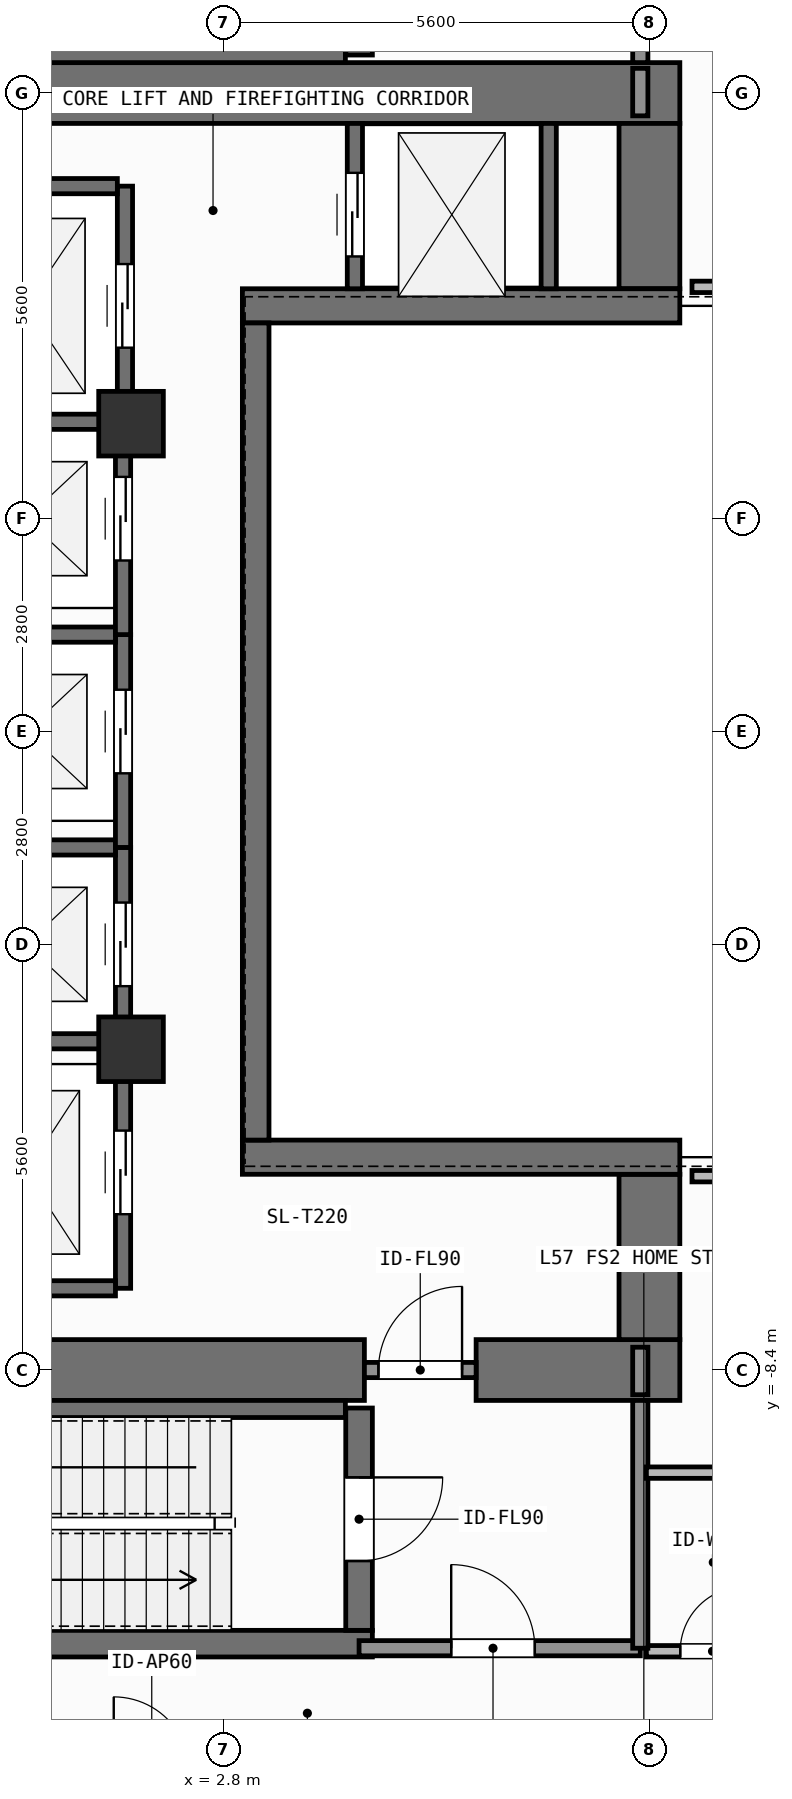
"""IFC4 building model, lengths in metres.
Left out: names, types, materials, properties, quantities, classifications, styles, units other than length and angle.
Written with IfcOpenShell. Run it as: python <this file> out.ifc"""

import sys

from ifc_helpers import new_model, si_unit, direction, frame, frame_2d, origin, origin_2d, place, context, subcontext, project, spatial, rectangle, extrude, element, fill, save


model = new_model("IFC4")
c1 = context("Model", 3, precision=1e-05, world=origin(), true_north=direction((0.0, 1.0)))
c2 = subcontext(c1, "Body", "Model", "MODEL_VIEW")
j1 = project(units=[si_unit("LENGTHUNIT", "METRE"), si_unit("PLANEANGLEUNIT", "RADIAN")], contexts=[c1])
p1 = place(None, origin())
s1 = spatial("IfcSite", under=j1, at=p1, CompositionType="ELEMENT")
p2 = place(p1, origin())
s2 = spatial("IfcBuilding", under=s1, at=p2, CompositionType="ELEMENT")
p3 = place(p2, frame((0.0, 0.0, 231.3)))
s3 = spatial("IfcBuildingStorey", under=s2, at=p3, CompositionType="ELEMENT", Elevation=231.3)
p4 = place(p3, frame((-2.62, -8.4, 0.0), z_axis=(0.0, 0.0, 1.0), x_axis=(1.0, 0.0, 0.0)))
e1 = element("IfcWall", 1, at=p4, inside=s3, PredefinedType="SHEAR", context=c2, shape_type="SweptSolid", body=[
    extrude(rectangle(XDim=7.27, YDim=0.8, at=frame_2d((3.635, 0.0))), origin(), (0.0, 0.0, 1.0), 3.9),
])
p5 = place(p3, frame((6.12, -8.4, 0.0), z_axis=(0.0, 0.0, 1.0), x_axis=(1.0, 0.0, 0.0)))
e2 = element("IfcWall", 2, at=p5, inside=s3, PredefinedType="SHEAR", context=c2, shape_type="SweptSolid", body=[
    extrude(rectangle(XDim=2.68, YDim=0.8, at=frame_2d((1.34, 0.0))), origin(), (0.0, 0.0, 1.0), 3.9),
])
p6 = place(p3, frame((-7.55, 8.4, 0.0), z_axis=(0.0, 0.0, 1.0), x_axis=(1.0, 0.0, 0.0)))
e3 = element("IfcWall", 3, at=p6, inside=s3, PredefinedType="SHEAR", context=c2, shape_type="SweptSolid", body=[
    extrude(rectangle(XDim=16.35, YDim=0.8, at=frame_2d((8.175, 0.0))), origin(), (0.0, 0.0, 1.0), 3.9),
])
for number, where, z_axis, x_axis in (
    (4, (8.4, -8.0, 0.0), (0.0, 0.0, 1.0), (0.0, 1.0, 0.0)),
    (5, (8.4, 5.825, 0.0), (0.0, 0.0, 1.0), (0.0, 1.0, 0.0)),
):
    element("IfcWall", number, at=place(p3, frame(where, z_axis=z_axis, x_axis=x_axis)), inside=s3, PredefinedType="SHEAR", context=c2, shape_type="SweptSolid", body=[
        extrude(rectangle(XDim=2.175, YDim=0.8, at=frame_2d((1.087, 0.0))), origin(), (0.0, 0.0, 1.0), 3.9),
    ])
for number, where, z_axis, x_axis in (
    (6, (3.045, -5.6, 0.0), (0.0, 0.0, 1.0), (1.0, 0.0, 0.0)),
    (7, (3.045, 5.6, 0.0), (0.0, 0.0, 1.0), (1.0, 0.0, 0.0)),
):
    element("IfcWall", number, at=place(p3, frame(where, z_axis=z_axis, x_axis=x_axis)), inside=s3, PredefinedType="SHEAR", context=c2, shape_type="SweptSolid", body=[
        extrude(rectangle(XDim=5.755, YDim=0.45, at=frame_2d((2.877, 0.0))), origin(), (0.0, 0.0, 1.0), 3.9),
    ])
p7 = place(p3, frame((3.22, -5.375, 0.0), z_axis=(0.0, 0.0, 1.0), x_axis=(0.0, 1.0, 0.0)))
e8 = element("IfcWall", 8, at=p7, inside=s3, PredefinedType="SHEAR", context=c2, shape_type="SweptSolid", body=[
    extrude(rectangle(XDim=10.75, YDim=0.35, at=frame_2d((5.375, 0.0))), origin(), (0.0, 0.0, 1.0), 3.9),
])
p8 = place(p3, frame((-2.555, -12.0, 0.0), z_axis=(0.0, 0.0, 1.0), x_axis=(1.0, 0.0, 0.0)))
e9 = element("IfcWall", 9, at=p8, inside=s3, PredefinedType="SHEAR", context=c2, shape_type="SweptSolid", body=[
    extrude(rectangle(XDim=7.31, YDim=0.35, at=frame_2d((3.655, 0.0))), origin(), (0.0, 0.0, 1.0), 3.9),
])
p9 = place(p3, frame((-2.2, -8.913, 0.0), z_axis=(0.0, 0.0, 1.0), x_axis=(1.0, 0.0, 0.0)))
e10 = element("IfcWall", 10, at=p9, inside=s3, PredefinedType="SHEAR", context=c2, shape_type="SweptSolid", body=[
    extrude(rectangle(XDim=6.6, YDim=0.225, at=frame_2d((3.3, 0.0))), origin(), (0.0, 0.0, 1.0), 3.9),
])
p10 = place(p3, frame((4.58, -8.9, 0.0), z_axis=(0.0, 0.0, 1.0), x_axis=(0.0, -1.0, 0.0)))
e11 = element("IfcWall", 11, at=p10, inside=s3, PredefinedType="SHEAR", context=c2, shape_type="SweptSolid", body=[
    extrude(rectangle(XDim=2.925, YDim=0.35, at=frame_2d((1.462, 0.0))), origin(), (0.0, 0.0, 1.0), 3.9),
])
p11 = place(p10, frame((0.913, 0.0, 0.0)))
e12 = element("IfcOpeningElement", 12, at=p11, cuts=e11, PredefinedType="OPENING", context=c2, shape_type="SweptSolid", body=[
    extrude(rectangle(XDim=1.1, YDim=2.15, at=frame_2d((0.55, 1.075))), frame((0.0, 0.185, 0.0), z_axis=(0.0, -1.0, 0.0), x_axis=(1.0, 0.0, 0.0)), (0.0, 0.0, 1.0), 0.37),
])
p12 = place(p3, frame((-2.2, 8.913, 0.0), z_axis=(0.0, 0.0, 1.0), x_axis=(1.0, 0.0, 0.0)))
e13 = element("IfcWall", 13, at=p12, inside=s3, PredefinedType="SHEAR", context=c2, shape_type="SweptSolid", body=[
    extrude(rectangle(XDim=6.6, YDim=0.225, at=frame_2d((3.3, 0.0))), origin(), (0.0, 0.0, 1.0), 3.9),
])
p13 = place(p3, frame((4.58, 11.825, 0.0), z_axis=(0.0, 0.0, 1.0), x_axis=(0.0, -1.0, 0.0)))
e14 = element("IfcWall", 14, at=p13, inside=s3, PredefinedType="SHEAR", context=c2, shape_type="SweptSolid", body=[
    extrude(rectangle(XDim=2.925, YDim=0.35, at=frame_2d((1.462, 0.0))), origin(), (0.0, 0.0, 1.0), 3.9),
])
p14 = place(p13, frame((0.913, 0.0, 0.0)))
e15 = element("IfcOpeningElement", 15, at=p14, cuts=e14, PredefinedType="OPENING", context=c2, shape_type="SweptSolid", body=[
    extrude(rectangle(XDim=1.1, YDim=2.15, at=frame_2d((0.55, 1.075))), frame((0.0, 0.185, 0.0), z_axis=(0.0, -1.0, 0.0), x_axis=(1.0, 0.0, 0.0)), (0.0, 0.0, 1.0), 0.37),
])
for number, where, z_axis, x_axis in (
    (16, (1.58, -4.18, 0.0), (0.0, 0.0, 1.0), (1.0, 0.0, 0.0)),
    (17, (1.58, 4.05, 0.0), (0.0, 0.0, 1.0), (1.0, 0.0, 0.0)),
):
    element("IfcColumn", number, at=place(p3, frame(where, z_axis=z_axis, x_axis=x_axis)), inside=s3, PredefinedType="COLUMN", context=c2, shape_type="SweptSolid", body=[
        extrude(rectangle(XDim=0.85, YDim=0.85, at=origin_2d()), origin(), (0.0, 0.0, 1.0), 3.9),
    ])
p15 = place(p3, frame((1.475, -4.275, 0.0), z_axis=(0.0, 0.0, 1.0), x_axis=(0.0, 1.0, 0.0)))
e18 = element("IfcWall", 18, at=p15, inside=s3, PredefinedType="SHEAR", context=c2, shape_type="SweptSolid", body=[
    extrude(rectangle(XDim=2.75, YDim=0.2, at=frame_2d((1.375, 0.0))), origin(), (0.0, 0.0, 1.0), 3.6),
])
p16 = place(p15, frame((0.925, 0.0, 0.0)))
e19 = element("IfcOpeningElement", 19, at=p16, cuts=e18, PredefinedType="OPENING", context=c2, shape_type="SweptSolid", body=[
    extrude(rectangle(XDim=1.1, YDim=2.2, at=frame_2d((0.55, 1.1))), frame((0.0, 0.11, 0.0), z_axis=(0.0, -1.0, 0.0), x_axis=(1.0, 0.0, 0.0)), (0.0, 0.0, 1.0), 0.22),
])
for number, where, z_axis, x_axis in (
    (20, (-0.975, -4.075, 0.0), (0.0, 0.0, 1.0), (1.0, 0.0, 0.0)),
    (21, (-0.975, -1.525, 0.0), (0.0, 0.0, 1.0), (1.0, 0.0, 0.0)),
):
    element("IfcWall", number, at=place(p3, frame(where, z_axis=z_axis, x_axis=x_axis)), inside=s3, PredefinedType="SHEAR", context=c2, shape_type="SweptSolid", body=[
        extrude(rectangle(XDim=2.35, YDim=0.2, at=frame_2d((1.175, 0.0))), origin(), (0.0, 0.0, 1.0), 3.6),
    ])
p17 = place(p3, frame((1.475, -1.525, 0.0), z_axis=(0.0, 0.0, 1.0), x_axis=(0.0, 1.0, 0.0)))
e22 = element("IfcWall", 22, at=p17, inside=s3, PredefinedType="SHEAR", context=c2, shape_type="SweptSolid", body=[
    extrude(rectangle(XDim=2.8, YDim=0.2, at=frame_2d((1.4, 0.0))), origin(), (0.0, 0.0, 1.0), 3.6),
])
p18 = place(p17, frame((0.975, 0.0, 0.0)))
e23 = element("IfcOpeningElement", 23, at=p18, cuts=e22, PredefinedType="OPENING", context=c2, shape_type="SweptSolid", body=[
    extrude(rectangle(XDim=1.1, YDim=2.2, at=frame_2d((0.55, 1.1))), frame((0.0, 0.11, 0.0), z_axis=(0.0, -1.0, 0.0), x_axis=(1.0, 0.0, 0.0)), (0.0, 0.0, 1.0), 0.22),
])
p19 = place(p3, frame((-0.975, 1.275, 0.0), z_axis=(0.0, 0.0, 1.0), x_axis=(1.0, 0.0, 0.0)))
e24 = element("IfcWall", 24, at=p19, inside=s3, PredefinedType="SHEAR", context=c2, shape_type="SweptSolid", body=[
    extrude(rectangle(XDim=2.35, YDim=0.2, at=frame_2d((1.175, 0.0))), origin(), (0.0, 0.0, 1.0), 3.6),
])
p20 = place(p3, frame((1.475, 1.275, 0.0), z_axis=(0.0, 0.0, 1.0), x_axis=(0.0, 1.0, 0.0)))
e25 = element("IfcWall", 25, at=p20, inside=s3, PredefinedType="SHEAR", context=c2, shape_type="SweptSolid", body=[
    extrude(rectangle(XDim=2.8, YDim=0.2, at=frame_2d((1.4, 0.0))), origin(), (0.0, 0.0, 1.0), 3.6),
])
p21 = place(p20, frame((0.975, 0.0, 0.0)))
e26 = element("IfcOpeningElement", 26, at=p21, cuts=e25, PredefinedType="OPENING", context=c2, shape_type="SweptSolid", body=[
    extrude(rectangle(XDim=1.1, YDim=2.2, at=frame_2d((0.55, 1.1))), frame((0.0, 0.11, 0.0), z_axis=(0.0, -1.0, 0.0), x_axis=(1.0, 0.0, 0.0)), (0.0, 0.0, 1.0), 0.22),
])
p22 = place(p3, frame((-0.975, 4.075, 0.0), z_axis=(0.0, 0.0, 1.0), x_axis=(1.0, 0.0, 0.0)))
e27 = element("IfcWall", 27, at=p22, inside=s3, PredefinedType="SHEAR", context=c2, shape_type="SweptSolid", body=[
    extrude(rectangle(XDim=2.35, YDim=0.2, at=frame_2d((1.175, 0.0))), origin(), (0.0, 0.0, 1.0), 3.6),
])
p23 = place(p3, frame((1.5, 4.025, 0.0), z_axis=(0.0, 0.0, 1.0), x_axis=(0.0, 1.0, 0.0)))
e28 = element("IfcWall", 28, at=p23, inside=s3, PredefinedType="SHEAR", context=c2, shape_type="SweptSolid", body=[
    extrude(rectangle(XDim=3.15, YDim=0.2, at=frame_2d((1.575, 0.0))), origin(), (0.0, 0.0, 1.0), 3.6),
])
p24 = place(p23, frame((1.025, 0.0, 0.0)))
e29 = element("IfcOpeningElement", 29, at=p24, cuts=e28, PredefinedType="OPENING", context=c2, shape_type="SweptSolid", body=[
    extrude(rectangle(XDim=1.1, YDim=2.2, at=frame_2d((0.55, 1.1))), frame((0.0, 0.11, 0.0), z_axis=(0.0, -1.0, 0.0), x_axis=(1.0, 0.0, 0.0)), (0.0, 0.0, 1.0), 0.22),
])
p25 = place(p3, frame((-1.0, 7.175, 0.0), z_axis=(0.0, 0.0, 1.0), x_axis=(1.0, 0.0, 0.0)))
e30 = element("IfcWall", 30, at=p25, inside=s3, PredefinedType="SHEAR", context=c2, shape_type="SweptSolid", body=[
    extrude(rectangle(XDim=2.4, YDim=0.2, at=frame_2d((1.2, 0.0))), origin(), (0.0, 0.0, 1.0), 3.6),
])
p26 = place(p3, frame((1.475, -7.325, 0.0), z_axis=(0.0, 0.0, 1.0), x_axis=(0.0, 1.0, 0.0)))
e31 = element("IfcWall", 31, at=p26, inside=s3, PredefinedType="SHEAR", context=c2, shape_type="SweptSolid", body=[
    extrude(rectangle(XDim=3.05, YDim=0.2, at=frame_2d((1.525, 0.0))), origin(), (0.0, 0.0, 1.0), 3.6),
])
p27 = place(p26, frame((0.975, 0.0, 0.0)))
e32 = element("IfcOpeningElement", 32, at=p27, cuts=e31, PredefinedType="OPENING", context=c2, shape_type="SweptSolid", body=[
    extrude(rectangle(XDim=1.1, YDim=2.2, at=frame_2d((0.55, 1.1))), frame((0.0, 0.11, 0.0), z_axis=(0.0, -1.0, 0.0), x_axis=(1.0, 0.0, 0.0)), (0.0, 0.0, 1.0), 0.22),
])
p28 = place(p3, frame((-0.975, -7.325, 0.0), z_axis=(0.0, 0.0, 1.0), x_axis=(1.0, 0.0, 0.0)))
e33 = element("IfcWall", 33, at=p28, inside=s3, PredefinedType="SHEAR", context=c2, shape_type="SweptSolid", body=[
    extrude(rectangle(XDim=2.35, YDim=0.2, at=frame_2d((1.175, 0.0))), origin(), (0.0, 0.0, 1.0), 3.6),
])
p29 = place(p3, frame((4.525, 5.825, 0.0), z_axis=(0.0, 0.0, 1.0), x_axis=(0.0, 1.0, 0.0)))
e34 = element("IfcWall", 34, at=p29, inside=s3, PredefinedType="SHEAR", context=c2, shape_type="SweptSolid", body=[
    extrude(rectangle(XDim=2.175, YDim=0.2, at=frame_2d((1.087, 0.0))), origin(), (0.0, 0.0, 1.0), 3.6),
])
p30 = place(p29, frame((0.425, 0.0, 0.0)))
e35 = element("IfcOpeningElement", 35, at=p30, cuts=e34, PredefinedType="OPENING", context=c2, shape_type="SweptSolid", body=[
    extrude(rectangle(XDim=1.1, YDim=2.2, at=frame_2d((0.55, 1.1))), frame((0.0, 0.11, 0.0), z_axis=(0.0, -1.0, 0.0), x_axis=(1.0, 0.0, 0.0)), (0.0, 0.0, 1.0), 0.22),
])
p31 = place(p3, frame((7.075, 5.825, 0.0), z_axis=(0.0, 0.0, 1.0), x_axis=(0.0, 1.0, 0.0)))
e36 = element("IfcWall", 36, at=p31, inside=s3, PredefinedType="SHEAR", context=c2, shape_type="SweptSolid", body=[
    extrude(rectangle(XDim=2.175, YDim=0.2, at=frame_2d((1.087, 0.0))), origin(), (0.0, 0.0, 1.0), 3.6),
])
p32 = place(p3, frame((4.58, -12.06, 0.0), z_axis=(0.0, 0.0, 1.0), x_axis=(1.0, 0.0, 0.0)))
e37 = element("IfcWall", 37, at=p32, inside=s3, PredefinedType="SOLIDWALL", context=c2, shape_type="SweptSolid", body=[
    extrude(rectangle(XDim=3.7, YDim=0.2, at=frame_2d((1.85, 0.0))), origin(), (0.0, 0.0, 1.0), 3.6),
])
p33 = place(p32, frame((1.212, 0.0, 0.0)))
e38 = element("IfcOpeningElement", 38, at=p33, cuts=e37, PredefinedType="OPENING", context=c2, shape_type="SweptSolid", body=[
    extrude(rectangle(XDim=1.1, YDim=2.15, at=frame_2d((0.55, 1.075))), frame((0.0, 0.11, 0.0), z_axis=(0.0, -1.0, 0.0), x_axis=(1.0, 0.0, 0.0)), (0.0, 0.0, 1.0), 0.22),
])
p34 = place(p3, frame((4.65, -8.4, 0.0), z_axis=(0.0, 0.0, 1.0), x_axis=(1.0, 0.0, 0.0)))
e39 = element("IfcWall", 39, at=p34, inside=s3, PredefinedType="SOLIDWALL", context=c2, shape_type="SweptSolid", body=[
    extrude(rectangle(XDim=1.47, YDim=0.2, at=frame_2d((0.735, 0.0))), origin(), (0.0, 0.0, 1.0), 2.74),
])
p35 = place(p34, frame((0.185, 0.0, 0.0)))
e40 = element("IfcOpeningElement", 40, at=p35, cuts=e39, PredefinedType="OPENING", context=c2, shape_type="SweptSolid", body=[
    extrude(rectangle(XDim=1.1, YDim=2.15, at=frame_2d((0.55, 1.075))), frame((0.0, 0.11, 0.0), z_axis=(0.0, -1.0, 0.0), x_axis=(1.0, 0.0, 0.0)), (0.0, 0.0, 1.0), 0.22),
])
p36 = place(p3, frame((8.36, -12.1, 0.0), z_axis=(0.0, 0.0, 1.0), x_axis=(1.0, 0.0, 0.0)))
e41 = element("IfcWall", 41, at=p36, inside=s3, PredefinedType="PARTITIONING", context=c2, shape_type="SweptSolid", body=[
    extrude(rectangle(XDim=1.74, YDim=0.15, at=frame_2d((0.87, 0.0))), origin(), (0.0, 0.0, 1.0), 3.6),
])
p37 = place(p36, frame((0.445, 0.0, 0.0)))
e42 = element("IfcOpeningElement", 42, at=p37, cuts=e41, PredefinedType="OPENING", context=c2, shape_type="SweptSolid", body=[
    extrude(rectangle(XDim=0.85, YDim=2.1, at=frame_2d((0.425, 1.05))), frame((0.0, 0.085, 0.0), z_axis=(0.0, -1.0, 0.0), x_axis=(1.0, 0.0, 0.0)), (0.0, 0.0, 1.0), 0.17),
])
for number, where, z_axis, x_axis in (
    (43, (8.28, -12.06, 0.0), (0.0, 0.0, 1.0), (0.0, 1.0, 0.0)),
    (44, (8.28, 8.8, 0.0), (0.0, 0.0, 1.0), (0.0, 1.0, 0.0)),
):
    element("IfcWall", number, at=place(p3, frame(where, z_axis=z_axis, x_axis=x_axis)), inside=s3, PredefinedType="SOLIDWALL", context=c2, shape_type="SweptSolid", body=[
        extrude(rectangle(XDim=3.26, YDim=0.2, at=frame_2d((1.63, 0.0))), origin(), (0.0, 0.0, 1.0), 3.6),
    ])
p38 = place(p3, frame((8.28, -8.725, 0.0), z_axis=(0.0, 0.0, 1.0), x_axis=(0.0, 1.0, 0.0)))
e45 = element("IfcWall", 45, at=p38, inside=s3, PredefinedType="SOLIDWALL", context=c2, shape_type="SweptSolid", body=[
    extrude(rectangle(XDim=0.625, YDim=0.2, at=frame_2d((0.312, 0.0))), origin(), (0.0, 0.0, 1.0), 3.6),
])
p39 = place(p3, frame((8.36, -9.75, 0.0), z_axis=(0.0, 0.0, 1.0), x_axis=(1.0, 0.0, 0.0)))
e46 = element("IfcWall", 46, at=p39, inside=s3, PredefinedType="PARTITIONING", context=c2, shape_type="SweptSolid", body=[
    extrude(rectangle(XDim=1.74, YDim=0.15, at=frame_2d((0.87, 0.0))), origin(), (0.0, 0.0, 1.0), 3.6),
])
p40 = place(p3, frame((8.96, -5.85, 0.0), z_axis=(0.0, 0.0, 1.0), x_axis=(1.0, 0.0, 0.0)))
e47 = element("IfcWall", 47, at=p40, inside=s3, PredefinedType="PARTITIONING", context=c2, shape_type="SweptSolid", body=[
    extrude(rectangle(XDim=6.62, YDim=0.15, at=frame_2d((3.31, 0.0))), origin(), (0.0, 0.0, 1.0), 3.6),
])
p41 = place(p3, frame((8.28, 8.1, 0.0), z_axis=(0.0, 0.0, 1.0), x_axis=(0.0, 1.0, 0.0)))
e48 = element("IfcWall", 48, at=p41, inside=s3, PredefinedType="SOLIDWALL", context=c2, shape_type="SweptSolid", body=[
    extrude(rectangle(XDim=0.625, YDim=0.2, at=frame_2d((0.312, 0.0))), origin(), (0.0, 0.0, 1.0), 3.6),
])
p42 = place(p3, frame((8.96, 5.85, 0.0), z_axis=(0.0, 0.0, 1.0), x_axis=(1.0, 0.0, 0.0)))
e49 = element("IfcWall", 49, at=p42, inside=s3, PredefinedType="PARTITIONING", context=c2, shape_type="SweptSolid", body=[
    extrude(rectangle(XDim=6.62, YDim=0.15, at=frame_2d((3.31, 0.0))), origin(), (0.0, 0.0, 1.0), 3.6),
])
p43 = place(p16, origin())
e50 = element("IfcDoor", 50, at=p43, inside=s3, OperationType="SLIDING_TO_LEFT", PredefinedType="DOOR", context=c2, shape_type="SweptSolid", body=[
    extrude(rectangle(XDim=1.1, YDim=2.2, at=frame_2d((0.55, 1.1))), frame((0.0, 0.025, 0.0), z_axis=(0.0, -1.0, 0.0), x_axis=(1.0, 0.0, 0.0)), (0.0, 0.0, 1.0), 0.05),
])
fill(e19, e50)
p44 = place(p18, origin())
e51 = element("IfcDoor", 51, at=p44, inside=s3, OperationType="SLIDING_TO_LEFT", PredefinedType="DOOR", context=c2, shape_type="SweptSolid", body=[
    extrude(rectangle(XDim=1.1, YDim=2.2, at=frame_2d((0.55, 1.1))), frame((0.0, 0.025, 0.0), z_axis=(0.0, -1.0, 0.0), x_axis=(1.0, 0.0, 0.0)), (0.0, 0.0, 1.0), 0.05),
])
fill(e23, e51)
p45 = place(p21, origin())
e52 = element("IfcDoor", 52, at=p45, inside=s3, OperationType="SLIDING_TO_LEFT", PredefinedType="DOOR", context=c2, shape_type="SweptSolid", body=[
    extrude(rectangle(XDim=1.1, YDim=2.2, at=frame_2d((0.55, 1.1))), frame((0.0, 0.025, 0.0), z_axis=(0.0, -1.0, 0.0), x_axis=(1.0, 0.0, 0.0)), (0.0, 0.0, 1.0), 0.05),
])
fill(e26, e52)
p46 = place(p24, origin())
e53 = element("IfcDoor", 53, at=p46, inside=s3, OperationType="SLIDING_TO_LEFT", PredefinedType="DOOR", context=c2, shape_type="SweptSolid", body=[
    extrude(rectangle(XDim=1.1, YDim=2.2, at=frame_2d((0.55, 1.1))), frame((0.0, 0.025, 0.0), z_axis=(0.0, -1.0, 0.0), x_axis=(1.0, 0.0, 0.0)), (0.0, 0.0, 1.0), 0.05),
])
fill(e29, e53)
p47 = place(p27, origin())
e54 = element("IfcDoor", 54, at=p47, inside=s3, OperationType="SLIDING_TO_LEFT", PredefinedType="DOOR", context=c2, shape_type="SweptSolid", body=[
    extrude(rectangle(XDim=1.1, YDim=2.2, at=frame_2d((0.55, 1.1))), frame((0.0, 0.025, 0.0), z_axis=(0.0, -1.0, 0.0), x_axis=(1.0, 0.0, 0.0)), (0.0, 0.0, 1.0), 0.05),
])
fill(e32, e54)
p48 = place(p30, origin())
e55 = element("IfcDoor", 55, at=p48, inside=s3, OperationType="SLIDING_TO_LEFT", PredefinedType="DOOR", context=c2, shape_type="SweptSolid", body=[
    extrude(rectangle(XDim=1.1, YDim=2.2, at=frame_2d((0.55, 1.1))), frame((0.0, 0.025, 0.0), z_axis=(0.0, -1.0, 0.0), x_axis=(1.0, 0.0, 0.0)), (0.0, 0.0, 1.0), 0.05),
])
fill(e35, e55)
p49 = place(p11, origin())
e56 = element("IfcDoor", 56, at=p49, inside=s3, OperationType="SINGLE_SWING_LEFT", PredefinedType="DOOR", context=c2, shape_type="SweptSolid", body=[
    extrude(rectangle(XDim=1.1, YDim=2.15, at=frame_2d((0.55, 1.075))), frame((0.0, 0.025, 0.0), z_axis=(0.0, -1.0, 0.0), x_axis=(1.0, 0.0, 0.0)), (0.0, 0.0, 1.0), 0.05),
])
fill(e12, e56)
p50 = place(p33, origin())
e57 = element("IfcDoor", 57, at=p50, inside=s3, OperationType="SINGLE_SWING_LEFT", PredefinedType="DOOR", context=c2, shape_type="SweptSolid", body=[
    extrude(rectangle(XDim=1.1, YDim=2.15, at=frame_2d((0.55, 1.075))), frame((0.0, 0.025, 0.0), z_axis=(0.0, -1.0, 0.0), x_axis=(1.0, 0.0, 0.0)), (0.0, 0.0, 1.0), 0.05),
])
fill(e38, e57)
p51 = place(p35, origin())
e58 = element("IfcDoor", 58, at=p51, inside=s3, OperationType="SINGLE_SWING_RIGHT", PredefinedType="DOOR", context=c2, shape_type="SweptSolid", body=[
    extrude(rectangle(XDim=1.1, YDim=2.15, at=frame_2d((0.55, 1.075))), frame((0.0, 0.025, 0.0), z_axis=(0.0, -1.0, 0.0), x_axis=(1.0, 0.0, 0.0)), (0.0, 0.0, 1.0), 0.05),
])
fill(e40, e58)
p52 = place(p37, origin())
e59 = element("IfcDoor", 59, at=p52, inside=s3, OperationType="SINGLE_SWING_RIGHT", PredefinedType="DOOR", context=c2, shape_type="SweptSolid", body=[
    extrude(rectangle(XDim=0.85, YDim=2.1, at=frame_2d((0.425, 1.05))), frame((0.0, 0.025, 0.0), z_axis=(0.0, -1.0, 0.0), x_axis=(1.0, 0.0, 0.0)), (0.0, 0.0, 1.0), 0.05),
])
fill(e42, e59)
save(model, sys.argv[1])
